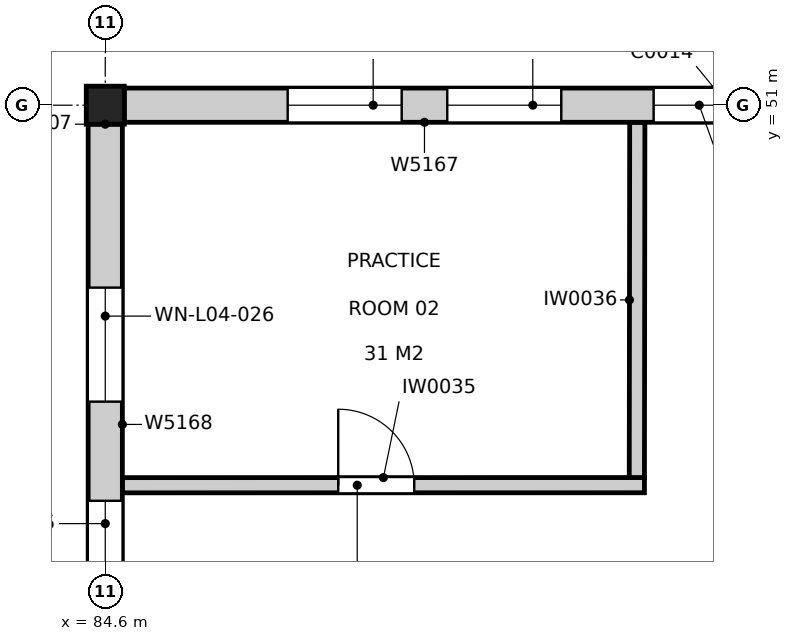
"""IFC4 building model, lengths in metres.
Left out: names, types, materials, properties, quantities, classifications, styles, units other than length and angle.
Written with IfcOpenShell. Run it as: python <this file> out.ifc"""

import sys

from ifc_helpers import new_model, si_unit, direction, frame, frame_2d, origin, origin_2d, place, context, subcontext, project, spatial, rectangle, extrude, element, fill, save


model = new_model("IFC4")
c1 = context("Model", 3, precision=1e-05, world=origin(), true_north=direction((0.0, 1.0)))
c2 = subcontext(c1, "Body", "Model", "MODEL_VIEW")
j1 = project(units=[si_unit("LENGTHUNIT", "METRE"), si_unit("PLANEANGLEUNIT", "RADIAN")], contexts=[c1])
p1 = place(None, origin())
s1 = spatial("IfcSite", under=j1, at=p1, CompositionType="ELEMENT")
p2 = place(p1, origin())
s2 = spatial("IfcBuilding", under=s1, at=p2, CompositionType="ELEMENT")
p3 = place(p2, frame((0.0, 0.0, 19.2)))
s3 = spatial("IfcBuildingStorey", under=s2, at=p3, CompositionType="ELEMENT", Elevation=19.2)
p4 = place(p3, frame((84.6, 51.0, 0.0), z_axis=(0.0, 0.0, 1.0), x_axis=(1.0, 0.0, 0.0)))
e1 = element("IfcColumn", 1, at=p4, inside=s3, PredefinedType="COLUMN", context=c2, shape_type="SweptSolid", body=[
    extrude(rectangle(XDim=0.5, YDim=0.5, at=origin_2d()), origin(), (0.0, 0.0, 1.0), 4.8),
])
p5 = place(p3, frame((84.825, 46.0, 0.0), z_axis=(0.0, 0.0, 1.0), x_axis=(0.999999989894, 0.000142171671, 0.0)))
e2 = element("IfcWall", 2, at=p5, inside=s3, PredefinedType="PARTITIONING", context=c2, shape_type="SweptSolid", body=[
    extrude(rectangle(XDim=6.869, YDim=0.2, at=frame_2d((3.435, 0.0))), origin(), (0.0, 0.0, 1.0), 4.64),
])
p6 = place(p5, frame((2.84, 0.0, 0.0)))
e3 = element("IfcOpeningElement", 3, at=p6, cuts=e2, PredefinedType="OPENING", context=c2, shape_type="SweptSolid", body=[
    extrude(rectangle(XDim=1.0, YDim=2.1, at=frame_2d((0.5, 1.05))), frame((0.0, 0.11, 0.0), z_axis=(0.0, -1.0, 0.0), x_axis=(1.0, 0.0, 0.0)), (0.0, 0.0, 1.0), 0.22),
])
p7 = place(p3, frame((91.594, 46.101, 0.0), z_axis=(0.0, 0.0, 1.0), x_axis=(0.001253655513, 0.999999214174, 0.0)))
e4 = element("IfcWall", 4, at=p7, inside=s3, PredefinedType="PARTITIONING", context=c2, shape_type="SweptSolid", body=[
    extrude(rectangle(XDim=4.674, YDim=0.2, at=frame_2d((2.337, 0.0))), origin(), (0.0, 0.0, 1.0), 3.94),
])
p8 = place(p3, frame((92.75, 51.0, 0.0), z_axis=(0.0, 0.0, 1.0), x_axis=(-1.0, 0.0, 0.0)))
e5 = element("IfcWall", 5, at=p8, inside=s3, PredefinedType="SOLIDWALL", context=c2, shape_type="SweptSolid", body=[
    extrude(rectangle(XDim=7.9, YDim=0.45, at=frame_2d((3.95, 0.0))), origin(), (0.0, 0.0, 1.0), 3.84),
])
p9 = place(p8, frame((4.25, 0.0, 0.9)))
e6 = element("IfcOpeningElement", 6, at=p9, cuts=e5, PredefinedType="OPENING", context=c2, shape_type="SweptSolid", body=[
    extrude(rectangle(XDim=1.5, YDim=1.5, at=frame_2d((0.75, 0.75))), frame((0.0, 0.235, 0.0), z_axis=(0.0, -1.0, 0.0), x_axis=(1.0, 0.0, 0.0)), (0.0, 0.0, 1.0), 0.47),
])
p10 = place(p8, frame((2.15, 0.0, 0.9)))
e7 = element("IfcOpeningElement", 7, at=p10, cuts=e5, PredefinedType="OPENING", context=c2, shape_type="SweptSolid", body=[
    extrude(rectangle(XDim=1.5, YDim=1.5, at=frame_2d((0.75, 0.75))), frame((0.0, 0.235, 0.0), z_axis=(0.0, -1.0, 0.0), x_axis=(1.0, 0.0, 0.0)), (0.0, 0.0, 1.0), 0.47),
])
p11 = place(p8, frame((0.135, 0.0, 0.9)))
e8 = element("IfcOpeningElement", 8, at=p11, cuts=e5, PredefinedType="OPENING", context=c2, shape_type="SweptSolid", body=[
    extrude(rectangle(XDim=0.8, YDim=2.4, at=frame_2d((0.4, 1.2))), frame((0.0, 0.235, 0.0), z_axis=(0.0, -1.0, 0.0), x_axis=(1.0, 0.0, 0.0)), (0.0, 0.0, 1.0), 0.47),
])
p12 = place(p3, frame((84.6, 50.75, 0.0), z_axis=(0.0, 0.0, 1.0), x_axis=(0.0, -1.0, 0.0)))
e9 = element("IfcWall", 9, at=p12, inside=s3, PredefinedType="SOLIDWALL", context=c2, shape_type="SweptSolid", body=[
    extrude(rectangle(XDim=7.9, YDim=0.45, at=frame_2d((3.95, 0.0))), origin(), (0.0, 0.0, 1.0), 3.84),
])
p13 = place(p12, frame((6.5, 0.0, 0.9)))
e10 = element("IfcOpeningElement", 10, at=p13, cuts=e9, PredefinedType="OPENING", context=c2, shape_type="SweptSolid", body=[
    extrude(rectangle(XDim=1.2, YDim=2.4, at=frame_2d((0.6, 1.2))), frame((0.0, 0.235, 0.0), z_axis=(0.0, -1.0, 0.0), x_axis=(1.0, 0.0, 0.0)), (0.0, 0.0, 1.0), 0.47),
])
p14 = place(p12, frame((4.955, 0.0, 0.9)))
e11 = element("IfcOpeningElement", 11, at=p14, cuts=e9, PredefinedType="OPENING", context=c2, shape_type="SweptSolid", body=[
    extrude(rectangle(XDim=1.2, YDim=2.4, at=frame_2d((0.6, 1.2))), frame((0.0, 0.235, 0.0), z_axis=(0.0, -1.0, 0.0), x_axis=(1.0, 0.0, 0.0)), (0.0, 0.0, 1.0), 0.47),
])
p15 = place(p12, frame((2.15, 0.0, 0.9)))
e12 = element("IfcOpeningElement", 12, at=p15, cuts=e9, PredefinedType="OPENING", context=c2, shape_type="SweptSolid", body=[
    extrude(rectangle(XDim=1.5, YDim=1.5, at=frame_2d((0.75, 0.75))), frame((0.0, 0.235, 0.0), z_axis=(0.0, -1.0, 0.0), x_axis=(1.0, 0.0, 0.0)), (0.0, 0.0, 1.0), 0.47),
])
p16 = place(p6, origin())
e13 = element("IfcDoor", 13, at=p16, inside=s3, OperationType="SINGLE_SWING_LEFT", PredefinedType="DOOR", context=c2, shape_type="SweptSolid", body=[
    extrude(rectangle(XDim=1.0, YDim=2.1, at=frame_2d((0.5, 1.05))), frame((0.0, 0.025, 0.0), z_axis=(0.0, -1.0, 0.0), x_axis=(1.0, 0.0, 0.0)), (0.0, 0.0, 1.0), 0.05),
])
fill(e3, e13)
p17 = place(p9, origin())
e14 = element("IfcWindow", 14, at=p17, inside=s3, PartitioningType="DOUBLE_PANEL_VERTICAL", PredefinedType="WINDOW", context=c2, shape_type="SweptSolid", body=[
    extrude(rectangle(XDim=1.5, YDim=1.5, at=frame_2d((0.75, 0.75))), frame((0.0, 0.135, 0.0), z_axis=(0.0, -1.0, 0.0), x_axis=(1.0, 0.0, 0.0)), (0.0, 0.0, 1.0), 0.06),
])
fill(e6, e14)
p18 = place(p10, origin())
e15 = element("IfcWindow", 15, at=p18, inside=s3, PartitioningType="DOUBLE_PANEL_VERTICAL", PredefinedType="WINDOW", context=c2, shape_type="SweptSolid", body=[
    extrude(rectangle(XDim=1.5, YDim=1.5, at=frame_2d((0.75, 0.75))), frame((0.0, 0.135, 0.0), z_axis=(0.0, -1.0, 0.0), x_axis=(1.0, 0.0, 0.0)), (0.0, 0.0, 1.0), 0.06),
])
fill(e7, e15)
p19 = place(p11, origin())
e16 = element("IfcWindow", 16, at=p19, inside=s3, PartitioningType="SINGLE_PANEL", PredefinedType="WINDOW", context=c2, shape_type="SweptSolid", body=[
    extrude(rectangle(XDim=0.8, YDim=2.4, at=frame_2d((0.4, 1.2))), frame((0.0, 0.135, 0.0), z_axis=(0.0, -1.0, 0.0), x_axis=(1.0, 0.0, 0.0)), (0.0, 0.0, 1.0), 0.06),
])
fill(e8, e16)
p20 = place(p14, origin())
e17 = element("IfcWindow", 17, at=p20, inside=s3, PartitioningType="SINGLE_PANEL", PredefinedType="WINDOW", context=c2, shape_type="SweptSolid", body=[
    extrude(rectangle(XDim=1.2, YDim=2.4, at=frame_2d((0.6, 1.2))), frame((0.0, 0.135, 0.0), z_axis=(0.0, -1.0, 0.0), x_axis=(1.0, 0.0, 0.0)), (0.0, 0.0, 1.0), 0.06),
])
fill(e11, e17)
p21 = place(p15, origin())
e18 = element("IfcWindow", 18, at=p21, inside=s3, PartitioningType="DOUBLE_PANEL_VERTICAL", PredefinedType="WINDOW", context=c2, shape_type="SweptSolid", body=[
    extrude(rectangle(XDim=1.5, YDim=1.5, at=frame_2d((0.75, 0.75))), frame((0.0, 0.135, 0.0), z_axis=(0.0, -1.0, 0.0), x_axis=(1.0, 0.0, 0.0)), (0.0, 0.0, 1.0), 0.06),
])
fill(e12, e18)
save(model, sys.argv[1])
